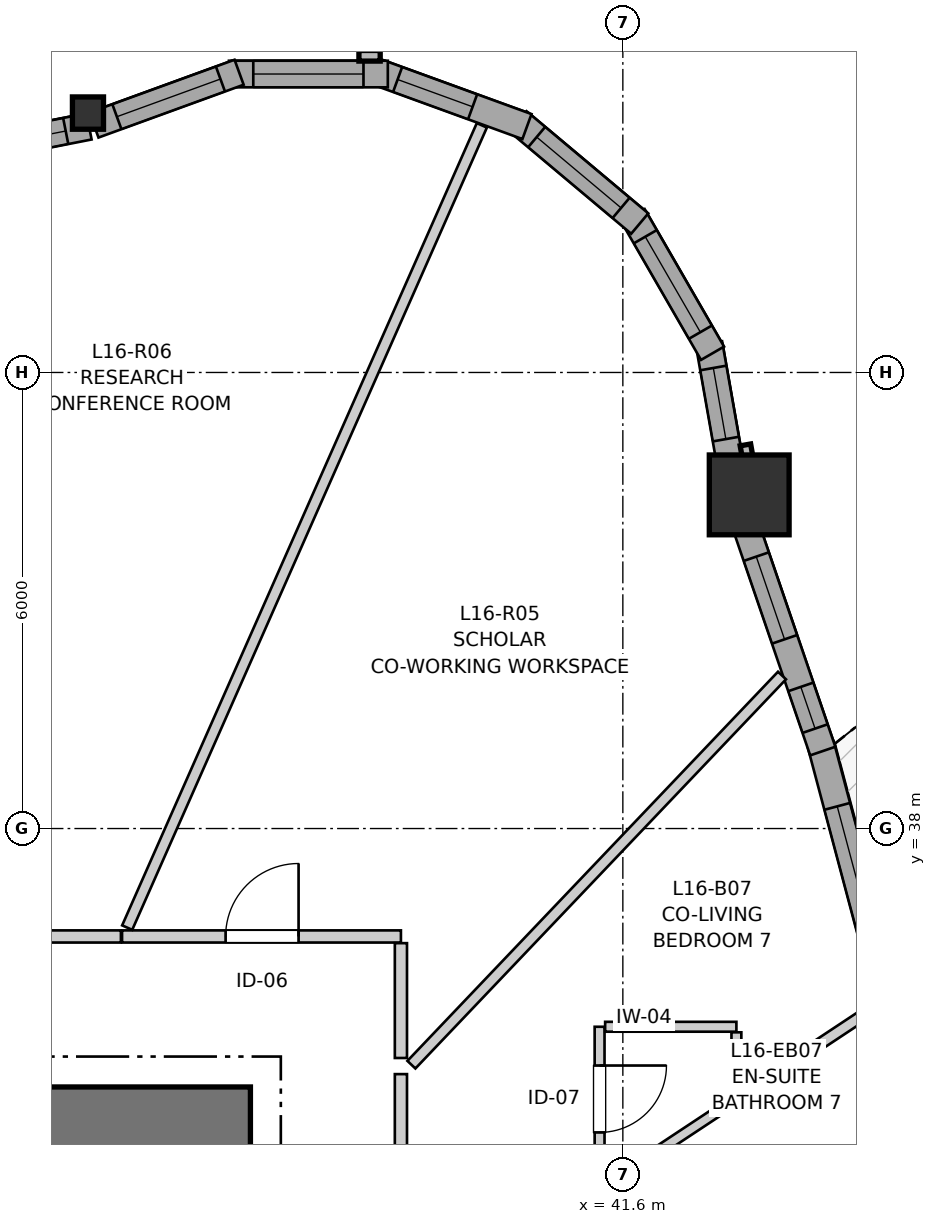
"""IFC4 building model, lengths in metres.
Left out: names, types, materials, properties, quantities, classifications, styles, units other than length and angle.
Written with IfcOpenShell. Run it as: python <this file> out.ifc"""

import sys

from ifc_helpers import new_model, si_unit, direction, frame, frame_2d, origin, origin_2d, place, context, subcontext, project, spatial, rectangle, i_section, extrude, source, transform, mapped, element, fill, save


model = new_model("IFC4")
c1 = context("Model", 3, precision=1e-05, world=origin(), true_north=direction((0.0, 1.0)))
c2 = subcontext(c1, "Body", "Model", "MODEL_VIEW")
j1 = project(units=[si_unit("LENGTHUNIT", "METRE"), si_unit("PLANEANGLEUNIT", "RADIAN")], contexts=[c1])
p1 = place(None, origin())
s1 = spatial("IfcSite", under=j1, at=p1, CompositionType="ELEMENT")
p2 = place(p1, origin())
s2 = spatial("IfcBuilding", under=s1, at=p2, CompositionType="ELEMENT")
p3 = place(p2, frame((0.0, 0.0, 55.8)))
s3 = spatial("IfcBuildingStorey", under=s2, at=p3, CompositionType="ELEMENT", Elevation=55.8)
p4 = place(p3, frame((36.7, 34.2, 0.0), z_axis=(0.0, 0.0, 1.0), x_axis=(-1.0, 0.0, 0.0)))
e1 = element("IfcWall", 1, at=p4, inside=s3, PredefinedType="SHEAR", context=c2, shape_type="SweptSolid", body=[
    extrude(rectangle(XDim=12.7, YDim=0.8, at=frame_2d((6.35, 0.0))), origin(), (0.0, 0.0, 1.0), 2.94),
])
m1 = source(origin(), c2, "Body", "SweptSolid", [
    extrude(rectangle(XDim=1.05, YDim=1.05, at=origin_2d()), origin(), (0.0, 0.0, 1.0), 2.94),
])
p5 = place(p3, frame((43.262, 42.389, 0.0), z_axis=(0.0, 0.0, 1.0), x_axis=(1.0, 0.0, 0.0)))
e2 = element("IfcColumn", 2, at=p5, inside=s3, PredefinedType="COLUMN", context=c2, shape_type="MappedRepresentation", body=[
    mapped(m1, transform((0.0, 0.0, 0.0), x_axis=(1.0, 0.0, 0.0), y_axis=(0.0, 1.0, 0.0), z_axis=(0.0, 0.0, 1.0), scale=1.0)),
])
m2 = source(origin(), c2, "Body", "SweptSolid", [
    extrude(i_section(OverallWidth=0.409, OverallDepth=0.425, WebThickness=0.03, FlangeThickness=0.048, FilletRadius=0.015, at=origin_2d()), origin(), (0.0, 0.0, 1.0), 2.94),
])
p6 = place(p3, frame((34.562, 47.413, 0.0), z_axis=(0.0, 0.0, 1.0), x_axis=(1.0, 0.0, 0.0)))
e3 = element("IfcColumn", 3, at=p6, inside=s3, PredefinedType="PILASTER", context=c2, shape_type="MappedRepresentation", body=[
    mapped(m2, transform((0.0, 0.0, 0.0), x_axis=(1.0, 0.0, 0.0), y_axis=(0.0, 1.0, 0.0), z_axis=(0.0, 0.0, 1.0), scale=1.0)),
])
p7 = place(p3, frame((45.081, 35.808, 0.0), z_axis=(0.0, 0.0, 1.0), x_axis=(-0.257114470429, 0.966380954436, 0.0)))
e4 = element("IfcWall", 4, at=p7, inside=s3, PredefinedType="SOLIDWALL", context=c2, shape_type="SweptSolid", body=[
    extrude(rectangle(XDim=3.41, YDim=0.35, at=frame_2d((1.705, 0.0))), origin(), (0.0, 0.0, 1.0), 2.42),
])
p8 = place(p7, frame((0.82, 0.0, 0.82)))
e5 = element("IfcOpeningElement", 5, at=p8, cuts=e4, PredefinedType="OPENING", context=c2, shape_type="SweptSolid", body=[
    extrude(rectangle(XDim=1.75, YDim=1.3, at=frame_2d((0.875, 0.65))), frame((0.0, 0.185, 0.0), z_axis=(0.0, -1.0, 0.0), x_axis=(1.0, 0.0, 0.0)), (0.0, 0.0, 1.0), 0.37),
])
p9 = place(p3, frame((44.23, 39.019, 0.0), z_axis=(0.0, 0.0, 1.0), x_axis=(-0.323560153501, 0.94620760252, 0.0)))
e6 = element("IfcWall", 6, at=p9, inside=s3, PredefinedType="SOLIDWALL", context=c2, shape_type="SweptSolid", body=[
    extrude(rectangle(XDim=3.202, YDim=0.35, at=frame_2d((1.601, 0.0))), origin(), (0.0, 0.0, 1.0), 2.42),
])
p10 = place(p9, frame((0.312, 0.0, 0.82)))
e7 = element("IfcOpeningElement", 7, at=p10, cuts=e6, PredefinedType="OPENING", context=c2, shape_type="SweptSolid", body=[
    extrude(rectangle(XDim=0.58, YDim=1.35, at=frame_2d((0.29, 0.675))), frame((0.0, 0.185, 0.0), z_axis=(0.0, -1.0, 0.0), x_axis=(1.0, 0.0, 0.0)), (0.0, 0.0, 1.0), 0.37),
])
p11 = place(p9, frame((1.554, 0.0, 0.82)))
e8 = element("IfcOpeningElement", 8, at=p11, cuts=e6, PredefinedType="OPENING", context=c2, shape_type="SweptSolid", body=[
    extrude(rectangle(XDim=1.15, YDim=1.2, at=frame_2d((0.575, 0.6))), frame((0.0, 0.185, 0.0), z_axis=(0.0, -1.0, 0.0), x_axis=(1.0, 0.0, 0.0)), (0.0, 0.0, 1.0), 0.37),
])
p12 = place(p3, frame((43.038, 42.655, 0.0), z_axis=(0.0, 0.0, 1.0), x_axis=(-0.173610462023, 0.984814402553, 0.0)))
e9 = element("IfcWall", 9, at=p12, inside=s3, PredefinedType="SOLIDWALL", context=c2, shape_type="SweptSolid", body=[
    extrude(rectangle(XDim=1.752, YDim=0.35, at=frame_2d((0.876, 0.0))), origin(), (0.0, 0.0, 1.0), 2.42),
])
p13 = place(p12, frame((0.476, 0.0, 0.82)))
e10 = element("IfcOpeningElement", 10, at=p13, cuts=e9, PredefinedType="OPENING", context=c2, shape_type="SweptSolid", body=[
    extrude(rectangle(XDim=0.95, YDim=1.35, at=frame_2d((0.475, 0.675))), frame((0.0, 0.185, 0.0), z_axis=(0.0, -1.0, 0.0), x_axis=(1.0, 0.0, 0.0)), (0.0, 0.0, 1.0), 0.37),
])
p14 = place(p3, frame((42.78, 44.253, 0.0), z_axis=(0.0, 0.0, 1.0), x_axis=(-0.49990781971, 0.866078617559, 0.0)))
e11 = element("IfcWall", 11, at=p14, inside=s3, PredefinedType="SOLIDWALL", context=c2, shape_type="SweptSolid", body=[
    extrude(rectangle(XDim=2.09, YDim=0.35, at=frame_2d((1.045, 0.0))), origin(), (0.0, 0.0, 1.0), 2.42),
])
p15 = place(p14, frame((0.32, 0.0, 0.82)))
e12 = element("IfcOpeningElement", 12, at=p15, cuts=e11, PredefinedType="OPENING", context=c2, shape_type="SweptSolid", body=[
    extrude(rectangle(XDim=1.45, YDim=1.25, at=frame_2d((0.725, 0.625))), frame((0.0, 0.185, 0.0), z_axis=(0.0, -1.0, 0.0), x_axis=(1.0, 0.0, 0.0)), (0.0, 0.0, 1.0), 0.37),
])
p16 = place(p3, frame((41.822, 45.959, 0.0), z_axis=(0.0, 0.0, 1.0), x_axis=(-0.766024572719, 0.642811289563, 0.0)))
e13 = element("IfcWall", 13, at=p16, inside=s3, PredefinedType="SOLIDWALL", context=c2, shape_type="SweptSolid", body=[
    extrude(rectangle(XDim=2.09, YDim=0.35, at=frame_2d((1.045, 0.0))), origin(), (0.0, 0.0, 1.0), 2.42),
])
p17 = place(p16, frame((0.32, 0.0, 0.82)))
e14 = element("IfcOpeningElement", 14, at=p17, cuts=e13, PredefinedType="OPENING", context=c2, shape_type="SweptSolid", body=[
    extrude(rectangle(XDim=1.45, YDim=1.25, at=frame_2d((0.725, 0.625))), frame((0.0, 0.185, 0.0), z_axis=(0.0, -1.0, 0.0), x_axis=(1.0, 0.0, 0.0)), (0.0, 0.0, 1.0), 0.37),
])
p18 = place(p3, frame((40.338, 47.235, 0.0), z_axis=(0.0, 0.0, 1.0), x_axis=(-0.939711556618, 0.341968113072, 0.0)))
e15 = element("IfcWall", 15, at=p18, inside=s3, PredefinedType="SOLIDWALL", context=c2, shape_type="SweptSolid", body=[
    extrude(rectangle(XDim=2.09, YDim=0.35, at=frame_2d((1.045, 0.0))), origin(), (0.0, 0.0, 1.0), 2.42),
])
p19 = place(p18, frame((0.761, 0.0, 0.82)))
e16 = element("IfcOpeningElement", 16, at=p19, cuts=e15, PredefinedType="OPENING", context=c2, shape_type="SweptSolid", body=[
    extrude(rectangle(XDim=1.05, YDim=1.45, at=frame_2d((0.525, 0.725))), frame((0.0, 0.185, 0.0), z_axis=(0.0, -1.0, 0.0), x_axis=(1.0, 0.0, 0.0)), (0.0, 0.0, 1.0), 0.37),
])
p20 = place(p3, frame((38.508, 47.927, 0.0), z_axis=(0.0, 0.0, 1.0), x_axis=(-1.0, 0.0, 0.0)))
e17 = element("IfcWall", 17, at=p20, inside=s3, PredefinedType="SOLIDWALL", context=c2, shape_type="SweptSolid", body=[
    extrude(rectangle(XDim=2.091, YDim=0.35, at=frame_2d((1.045, 0.0))), origin(), (0.0, 0.0, 1.0), 2.42),
])
p21 = place(p20, frame((0.32, 0.0, 0.82)))
e18 = element("IfcOpeningElement", 18, at=p21, cuts=e17, PredefinedType="OPENING", context=c2, shape_type="SweptSolid", body=[
    extrude(rectangle(XDim=1.45, YDim=1.25, at=frame_2d((0.725, 0.625))), frame((0.0, 0.185, 0.0), z_axis=(0.0, -1.0, 0.0), x_axis=(1.0, 0.0, 0.0)), (0.0, 0.0, 1.0), 0.37),
])
p22 = place(p3, frame((36.551, 47.95, 0.0), z_axis=(0.0, 0.0, 1.0), x_axis=(-0.939691662178, -0.342022777067, 0.0)))
e19 = element("IfcWall", 19, at=p22, inside=s3, PredefinedType="SOLIDWALL", context=c2, shape_type="SweptSolid", body=[
    extrude(rectangle(XDim=2.032, YDim=0.35, at=frame_2d((1.016, 0.0))), origin(), (0.0, 0.0, 1.0), 2.42),
])
p23 = place(p22, frame((0.261, 0.0, 0.82)))
e20 = element("IfcOpeningElement", 20, at=p23, cuts=e19, PredefinedType="OPENING", context=c2, shape_type="SweptSolid", body=[
    extrude(rectangle(XDim=1.45, YDim=1.25, at=frame_2d((0.725, 0.625))), frame((0.0, 0.185, 0.0), z_axis=(0.0, -1.0, 0.0), x_axis=(1.0, 0.0, 0.0)), (0.0, 0.0, 1.0), 0.37),
])
p24 = place(p3, frame((34.577, 47.237, 0.0), z_axis=(0.0, 0.0, 1.0), x_axis=(-0.981238400755, -0.192798342532, 0.0)))
e21 = element("IfcWall", 21, at=p24, inside=s3, PredefinedType="SOLIDWALL", context=c2, shape_type="SweptSolid", body=[
    extrude(rectangle(XDim=3.482, YDim=0.35, at=frame_2d((1.741, 0.0))), origin(), (0.0, 0.0, 1.0), 2.42),
])
p25 = place(p24, frame((0.313, 0.0, 0.82)))
e22 = element("IfcOpeningElement", 22, at=p25, cuts=e21, PredefinedType="OPENING", context=c2, shape_type="SweptSolid", body=[
    extrude(rectangle(XDim=1.45, YDim=1.25, at=frame_2d((0.725, 0.625))), frame((0.0, 0.185, 0.0), z_axis=(0.0, -1.0, 0.0), x_axis=(1.0, 0.0, 0.0)), (0.0, 0.0, 1.0), 0.37),
])
p26 = place(p24, frame((2.234, 0.0, 0.82)))
e23 = element("IfcOpeningElement", 23, at=p26, cuts=e21, PredefinedType="OPENING", context=c2, shape_type="SweptSolid", body=[
    extrude(rectangle(XDim=0.95, YDim=1.35, at=frame_2d((0.475, 0.675))), frame((0.0, 0.185, 0.0), z_axis=(0.0, -1.0, 0.0), x_axis=(1.0, 0.0, 0.0)), (0.0, 0.0, 1.0), 0.37),
])
p27 = place(p3, frame((35.011, 36.58, 0.0), z_axis=(0.0, 0.0, 1.0), x_axis=(1.0, 0.0, 0.0)))
e24 = element("IfcWall", 24, at=p27, inside=s3, PredefinedType="PARTITIONING", context=c2, shape_type="SweptSolid", body=[
    extrude(rectangle(XDim=3.669, YDim=0.16, at=frame_2d((1.834, 0.0))), origin(), (0.0, 0.0, 1.0), 2.94),
])
p28 = place(p27, frame((1.363, 0.0, 0.0)))
e25 = element("IfcOpeningElement", 25, at=p28, cuts=e24, PredefinedType="OPENING", context=c2, shape_type="SweptSolid", body=[
    extrude(rectangle(XDim=0.96, YDim=2.1, at=frame_2d((0.48, 1.05))), frame((0.0, 0.09, 0.0), z_axis=(0.0, -1.0, 0.0), x_axis=(1.0, 0.0, 0.0)), (0.0, 0.0, 1.0), 0.18),
])
p29 = place(p3, frame((31.546, 36.58, 0.0), z_axis=(0.0, 0.0, 1.0), x_axis=(1.0, 0.0, 0.0)))
e26 = element("IfcWall", 26, at=p29, inside=s3, PredefinedType="PARTITIONING", context=c2, shape_type="SweptSolid", body=[
    extrude(rectangle(XDim=3.45, YDim=0.16, at=frame_2d((1.725, 0.0))), origin(), (0.0, 0.0, 1.0), 2.94),
])
p30 = place(p29, frame((1.075, 0.0, 0.0)))
e27 = element("IfcOpeningElement", 27, at=p30, cuts=e26, PredefinedType="OPENING", context=c2, shape_type="SweptSolid", body=[
    extrude(rectangle(XDim=1.3, YDim=2.1, at=frame_2d((0.65, 1.05))), frame((0.0, 0.09, 0.0), z_axis=(0.0, -1.0, 0.0), x_axis=(1.0, 0.0, 0.0)), (0.0, 0.0, 1.0), 0.18),
])
p31 = place(p3, frame((38.68, 34.769, 0.0), z_axis=(0.0, 0.0, 1.0), x_axis=(0.0, -1.0, 0.0)))
e28 = element("IfcWall", 28, at=p31, inside=s3, PredefinedType="PARTITIONING", context=c2, shape_type="SweptSolid", body=[
    extrude(rectangle(XDim=3.271, YDim=0.16, at=frame_2d((1.635, 0.0))), origin(), (0.0, 0.0, 1.0), 2.94),
])
p32 = place(p31, frame((1.177, 0.0, 0.0)))
e29 = element("IfcOpeningElement", 29, at=p32, cuts=e28, PredefinedType="OPENING", context=c2, shape_type="SweptSolid", body=[
    extrude(rectangle(XDim=0.92, YDim=2.1, at=frame_2d((0.46, 1.05))), frame((0.0, 0.09, 0.0), z_axis=(0.0, -1.0, 0.0), x_axis=(1.0, 0.0, 0.0)), (0.0, 0.0, 1.0), 0.18),
])
p33 = place(p3, frame((41.294, 35.392, 0.0), z_axis=(0.0, 0.0, 1.0), x_axis=(0.0, -1.0, 0.0)))
e30 = element("IfcWall", 30, at=p33, inside=s3, PredefinedType="PARTITIONING", context=c2, shape_type="SweptSolid", body=[
    extrude(rectangle(XDim=1.9, YDim=0.13, at=frame_2d((0.95, 0.0))), origin(), (0.0, 0.0, 1.0), 2.94),
])
p34 = place(p33, frame((0.51, 0.0, 0.0)))
e31 = element("IfcOpeningElement", 31, at=p34, cuts=e30, PredefinedType="OPENING", context=c2, shape_type="SweptSolid", body=[
    extrude(rectangle(XDim=0.88, YDim=2.05, at=frame_2d((0.44, 1.025))), frame((0.0, 0.075, 0.0), z_axis=(0.0, -1.0, 0.0), x_axis=(1.0, 0.0, 0.0)), (0.0, 0.0, 1.0), 0.15),
])
p35 = place(p3, frame((35.079, 36.697, 0.0), z_axis=(0.0, 0.0, 1.0), x_axis=(0.404349483928, 0.914604556542, 0.0)))
e32 = element("IfcWall", 32, at=p35, inside=s3, PredefinedType="PARTITIONING", context=c2, shape_type="SweptSolid", body=[
    extrude(rectangle(XDim=11.54, YDim=0.145, at=frame_2d((5.77, 0.0))), origin(), (0.0, 0.0, 1.0), 2.94),
])
p36 = place(p3, frame((38.818, 34.893, 0.0), z_axis=(0.0, 0.0, 1.0), x_axis=(0.68961378572, 0.724177344678, 0.0)))
e33 = element("IfcWall", 33, at=p36, inside=s3, PredefinedType="PARTITIONING", context=c2, shape_type="SweptSolid", body=[
    extrude(rectangle(XDim=7.071, YDim=0.145, at=frame_2d((3.535, 0.0))), origin(), (0.0, 0.0, 1.0), 2.94),
])
p37 = place(p3, frame((43.094, 34.439, 0.0), z_axis=(0.0, 0.0, 1.0), x_axis=(0.833690342454, 0.552232209219, 0.0)))
e34 = element("IfcWall", 34, at=p37, inside=s3, PredefinedType="PARTITIONING", context=c2, shape_type="SweptSolid", body=[
    extrude(rectangle(XDim=2.194, YDim=0.145, at=frame_2d((1.097, 0.0))), origin(), (0.0, 0.0, 1.0), 2.94),
])
p38 = place(p3, frame((41.367, 35.392, 0.0), z_axis=(0.0, 0.0, 1.0), x_axis=(1.0, 0.0, 0.0)))
e35 = element("IfcWall", 35, at=p38, inside=s3, PredefinedType="PARTITIONING", context=c2, shape_type="SweptSolid", body=[
    extrude(rectangle(XDim=1.727, YDim=0.13, at=frame_2d((0.864, 0.0))), origin(), (0.0, 0.0, 1.0), 2.94),
])
p39 = place(p3, frame((38.68, 34.981, 0.0), z_axis=(0.0, 0.0, 1.0), x_axis=(0.0, 1.0, 0.0)))
e36 = element("IfcWall", 36, at=p39, inside=s3, PredefinedType="PARTITIONING", context=c2, shape_type="SweptSolid", body=[
    extrude(rectangle(XDim=1.511, YDim=0.16, at=frame_2d((0.755, 0.0))), origin(), (0.0, 0.0, 1.0), 2.94),
])
p40 = place(p3, frame((41.676, 33.5, 0.0), z_axis=(0.0, 0.0, 1.0), x_axis=(0.833939065936, 0.55185653417, 0.0)))
e37 = element("IfcWall", 37, at=p40, inside=s3, PredefinedType="PARTITIONING", context=c2, shape_type="SweptSolid", body=[
    extrude(rectangle(XDim=1.686, YDim=0.13, at=frame_2d((0.843, 0.0))), origin(), (0.0, 0.0, 1.0), 2.94),
])
p41 = place(p3, frame((43.094, 34.577, 0.0), z_axis=(0.0, 0.0, 1.0), x_axis=(0.0, 1.0, 0.0)))
e38 = element("IfcWall", 38, at=p41, inside=s3, PredefinedType="PARTITIONING", context=c2, shape_type="SweptSolid", body=[
    extrude(rectangle(XDim=0.742, YDim=0.13, at=frame_2d((0.371, 0.0))), origin(), (0.0, 0.0, 1.0), 2.94),
])
m3 = source(origin(), c2, "Body", "SweptSolid", [
    extrude(rectangle(XDim=1.75, YDim=1.3, at=frame_2d((0.875, 0.65))), frame((0.0, 0.03, 0.0), z_axis=(0.0, -1.0, 0.0), x_axis=(1.0, 0.0, 0.0)), (0.0, 0.0, 1.0), 0.06),
])
p42 = place(p8, origin())
e39 = element("IfcWindow", 39, at=p42, inside=s3, PartitioningType="SINGLE_PANEL", PredefinedType="WINDOW", context=c2, shape_type="MappedRepresentation", body=[
    mapped(m3, transform((0.0, 0.0, 0.0), x_axis=(1.0, 0.0, 0.0), y_axis=(0.0, 1.0, 0.0), z_axis=(0.0, 0.0, 1.0), scale=1.0)),
])
fill(e5, e39)
m4 = source(origin(), c2, "Body", "SweptSolid", [
    extrude(rectangle(XDim=0.58, YDim=1.35, at=frame_2d((0.29, 0.675))), frame((0.0, 0.03, 0.0), z_axis=(0.0, -1.0, 0.0), x_axis=(1.0, 0.0, 0.0)), (0.0, 0.0, 1.0), 0.06),
])
p43 = place(p10, origin())
e40 = element("IfcWindow", 40, at=p43, inside=s3, PartitioningType="SINGLE_PANEL", PredefinedType="WINDOW", context=c2, shape_type="MappedRepresentation", body=[
    mapped(m4, transform((0.0, 0.0, 0.0), x_axis=(1.0, 0.0, 0.0), y_axis=(0.0, 1.0, 0.0), z_axis=(0.0, 0.0, 1.0), scale=1.0)),
])
fill(e7, e40)
m5 = source(origin(), c2, "Body", "SweptSolid", [
    extrude(rectangle(XDim=1.15, YDim=1.2, at=frame_2d((0.575, 0.6))), frame((0.0, 0.03, 0.0), z_axis=(0.0, -1.0, 0.0), x_axis=(1.0, 0.0, 0.0)), (0.0, 0.0, 1.0), 0.06),
])
p44 = place(p11, origin())
e41 = element("IfcWindow", 41, at=p44, inside=s3, PartitioningType="SINGLE_PANEL", PredefinedType="WINDOW", context=c2, shape_type="MappedRepresentation", body=[
    mapped(m5, transform((0.0, 0.0, 0.0), x_axis=(1.0, 0.0, 0.0), y_axis=(0.0, 1.0, 0.0), z_axis=(0.0, 0.0, 1.0), scale=1.0)),
])
fill(e8, e41)
m6 = source(origin(), c2, "Body", "SweptSolid", [
    extrude(rectangle(XDim=0.95, YDim=1.35, at=frame_2d((0.475, 0.675))), frame((0.0, 0.03, 0.0), z_axis=(0.0, -1.0, 0.0), x_axis=(1.0, 0.0, 0.0)), (0.0, 0.0, 1.0), 0.06),
])
p45 = place(p13, origin())
e42 = element("IfcWindow", 42, at=p45, inside=s3, PartitioningType="SINGLE_PANEL", PredefinedType="WINDOW", context=c2, shape_type="MappedRepresentation", body=[
    mapped(m6, transform((0.0, 0.0, 0.0), x_axis=(1.0, 0.0, 0.0), y_axis=(0.0, 1.0, 0.0), z_axis=(0.0, 0.0, 1.0), scale=1.0)),
])
fill(e10, e42)
m7 = source(origin(), c2, "Body", "SweptSolid", [
    extrude(rectangle(XDim=1.45, YDim=1.25, at=frame_2d((0.725, 0.625))), frame((0.0, 0.03, 0.0), z_axis=(0.0, -1.0, 0.0), x_axis=(1.0, 0.0, 0.0)), (0.0, 0.0, 1.0), 0.06),
])
p46 = place(p15, origin())
e43 = element("IfcWindow", 43, at=p46, inside=s3, PartitioningType="SINGLE_PANEL", PredefinedType="WINDOW", context=c2, shape_type="MappedRepresentation", body=[
    mapped(m7, transform((0.0, 0.0, 0.0), x_axis=(1.0, 0.0, 0.0), y_axis=(0.0, 1.0, 0.0), z_axis=(0.0, 0.0, 1.0), scale=1.0)),
])
fill(e12, e43)
p47 = place(p17, origin())
e44 = element("IfcWindow", 44, at=p47, inside=s3, PartitioningType="SINGLE_PANEL", PredefinedType="WINDOW", context=c2, shape_type="MappedRepresentation", body=[
    mapped(m7, transform((0.0, 0.0, 0.0), x_axis=(1.0, 0.0, 0.0), y_axis=(0.0, 1.0, 0.0), z_axis=(0.0, 0.0, 1.0), scale=1.0)),
])
fill(e14, e44)
m8 = source(origin(), c2, "Body", "SweptSolid", [
    extrude(rectangle(XDim=1.05, YDim=1.45, at=frame_2d((0.525, 0.725))), frame((0.0, 0.03, 0.0), z_axis=(0.0, -1.0, 0.0), x_axis=(1.0, 0.0, 0.0)), (0.0, 0.0, 1.0), 0.06),
])
p48 = place(p19, origin())
e45 = element("IfcWindow", 45, at=p48, inside=s3, PartitioningType="SINGLE_PANEL", PredefinedType="WINDOW", context=c2, shape_type="MappedRepresentation", body=[
    mapped(m8, transform((0.0, 0.0, 0.0), x_axis=(1.0, 0.0, 0.0), y_axis=(0.0, 1.0, 0.0), z_axis=(0.0, 0.0, 1.0), scale=1.0)),
])
fill(e16, e45)
p49 = place(p21, origin())
e46 = element("IfcWindow", 46, at=p49, inside=s3, PartitioningType="SINGLE_PANEL", PredefinedType="WINDOW", context=c2, shape_type="MappedRepresentation", body=[
    mapped(m7, transform((0.0, 0.0, 0.0), x_axis=(1.0, 0.0, 0.0), y_axis=(0.0, 1.0, 0.0), z_axis=(0.0, 0.0, 1.0), scale=1.0)),
])
fill(e18, e46)
p50 = place(p23, origin())
e47 = element("IfcWindow", 47, at=p50, inside=s3, PartitioningType="SINGLE_PANEL", PredefinedType="WINDOW", context=c2, shape_type="MappedRepresentation", body=[
    mapped(m7, transform((0.0, 0.0, 0.0), x_axis=(1.0, 0.0, 0.0), y_axis=(0.0, 1.0, 0.0), z_axis=(0.0, 0.0, 1.0), scale=1.0)),
])
fill(e20, e47)
p51 = place(p25, origin())
e48 = element("IfcWindow", 48, at=p51, inside=s3, PartitioningType="SINGLE_PANEL", PredefinedType="WINDOW", context=c2, shape_type="MappedRepresentation", body=[
    mapped(m7, transform((0.0, 0.0, 0.0), x_axis=(1.0, 0.0, 0.0), y_axis=(0.0, 1.0, 0.0), z_axis=(0.0, 0.0, 1.0), scale=1.0)),
])
fill(e22, e48)
m9 = source(origin(), c2, "Body", "SweptSolid", [
    extrude(rectangle(XDim=0.96, YDim=2.1, at=frame_2d((0.48, 1.05))), frame((0.0, 0.025, 0.0), z_axis=(0.0, -1.0, 0.0), x_axis=(1.0, 0.0, 0.0)), (0.0, 0.0, 1.0), 0.05),
])
p52 = place(p28, origin())
e49 = element("IfcDoor", 49, at=p52, inside=s3, OperationType="SINGLE_SWING_RIGHT", PredefinedType="DOOR", context=c2, shape_type="MappedRepresentation", body=[
    mapped(m9, transform((0.0, 0.0, 0.0), x_axis=(1.0, 0.0, 0.0), y_axis=(0.0, 1.0, 0.0), z_axis=(0.0, 0.0, 1.0), scale=1.0)),
])
fill(e25, e49)
m10 = source(origin(), c2, "Body", "SweptSolid", [
    extrude(rectangle(XDim=0.88, YDim=2.05, at=frame_2d((0.44, 1.025))), frame((0.0, 0.025, 0.0), z_axis=(0.0, -1.0, 0.0), x_axis=(1.0, 0.0, 0.0)), (0.0, 0.0, 1.0), 0.05),
])
p53 = place(p34, origin())
e50 = element("IfcDoor", 50, at=p53, inside=s3, OperationType="SINGLE_SWING_LEFT", PredefinedType="DOOR", context=c2, shape_type="MappedRepresentation", body=[
    mapped(m10, transform((0.0, 0.0, 0.0), x_axis=(1.0, 0.0, 0.0), y_axis=(0.0, 1.0, 0.0), z_axis=(0.0, 0.0, 1.0), scale=1.0)),
])
fill(e31, e50)
save(model, sys.argv[1])
